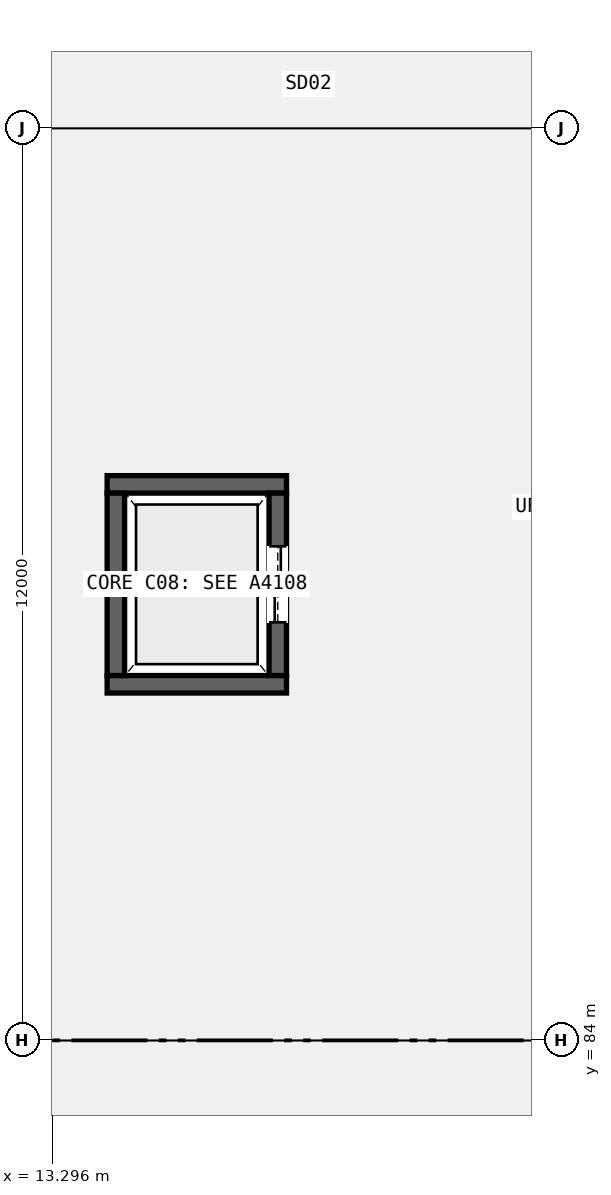
"""IFC4 building model, lengths in metres.
Left out: names, types, materials, properties, quantities, classifications, styles, units other than length and angle.
Written with IfcOpenShell. Run it as: python <this file> out.ifc"""

import sys

from ifc_helpers import new_model, si_unit, direction, frame, frame_2d, origin, place, context, subcontext, project, spatial, rectangle, extrude, element, fill, save


model = new_model("IFC4")
c1 = context("Model", 3, precision=1e-05, world=origin(), true_north=direction((0.0, 1.0)))
c2 = subcontext(c1, "Body", "Model", "MODEL_VIEW")
j1 = project(units=[si_unit("LENGTHUNIT", "METRE"), si_unit("PLANEANGLEUNIT", "RADIAN")], contexts=[c1])
p1 = place(None, origin())
s1 = spatial("IfcSite", under=j1, at=p1, CompositionType="ELEMENT")
p2 = place(p1, origin())
s2 = spatial("IfcBuilding", under=s1, at=p2, CompositionType="ELEMENT")
p3 = place(p2, frame((0.0, 0.0, 15.3)))
s3 = spatial("IfcBuildingStorey", under=s2, at=p3, CompositionType="ELEMENT", Elevation=15.3)
for number, where, z_axis, x_axis in (
    (1, (14.02, 88.685, 0.0), (0.0, 0.0, 1.0), (1.0, 0.0, 0.0)),
    (2, (14.02, 91.315, 0.0), (0.0, 0.0, 1.0), (1.0, 0.0, 0.0)),
):
    element("IfcWall", number, at=place(p3, frame(where, z_axis=z_axis, x_axis=x_axis)), inside=s3, PredefinedType="SHEAR", context=c2, shape_type="SweptSolid", body=[
        extrude(rectangle(XDim=2.36, YDim=0.23, at=frame_2d((1.18, 0.0))), origin(), (0.0, 0.0, 1.0), 4.86),
    ])
p4 = place(p3, frame((14.135, 88.8, 0.0), z_axis=(0.0, 0.0, 1.0), x_axis=(0.0, 1.0, 0.0)))
e3 = element("IfcWall", 3, at=p4, inside=s3, PredefinedType="SHEAR", context=c2, shape_type="SweptSolid", body=[
    extrude(rectangle(XDim=2.4, YDim=0.23, at=frame_2d((1.2, 0.0))), origin(), (0.0, 0.0, 1.0), 4.86),
])
p5 = place(p3, frame((16.265, 88.8, 0.0), z_axis=(0.0, 0.0, 1.0), x_axis=(0.0, 1.0, 0.0)))
e4 = element("IfcWall", 4, at=p5, inside=s3, PredefinedType="SHEAR", context=c2, shape_type="SweptSolid", body=[
    extrude(rectangle(XDim=2.4, YDim=0.23, at=frame_2d((1.2, 0.0))), origin(), (0.0, 0.0, 1.0), 4.86),
])
p6 = place(p5, frame((0.7, 0.0, 0.0)))
e5 = element("IfcOpeningElement", 5, at=p6, cuts=e4, PredefinedType="OPENING", context=c2, shape_type="SweptSolid", body=[
    extrude(rectangle(XDim=1.0, YDim=2.15, at=frame_2d((0.5, 1.075))), frame((0.0, 0.125, 0.0), z_axis=(0.0, -1.0, 0.0), x_axis=(1.0, 0.0, 0.0)), (0.0, 0.0, 1.0), 0.25),
])
p7 = place(p6, origin())
e6 = element("IfcDoor", 6, at=p7, inside=s3, OperationType="DOUBLE_DOOR_SLIDING", PredefinedType="DOOR", context=c2, shape_type="SweptSolid", body=[
    extrude(rectangle(XDim=1.0, YDim=2.15, at=frame_2d((0.5, 1.075))), frame((0.0, 0.025, 0.0), z_axis=(0.0, -1.0, 0.0), x_axis=(1.0, 0.0, 0.0)), (0.0, 0.0, 1.0), 0.05),
])
fill(e5, e6)
save(model, sys.argv[1])
